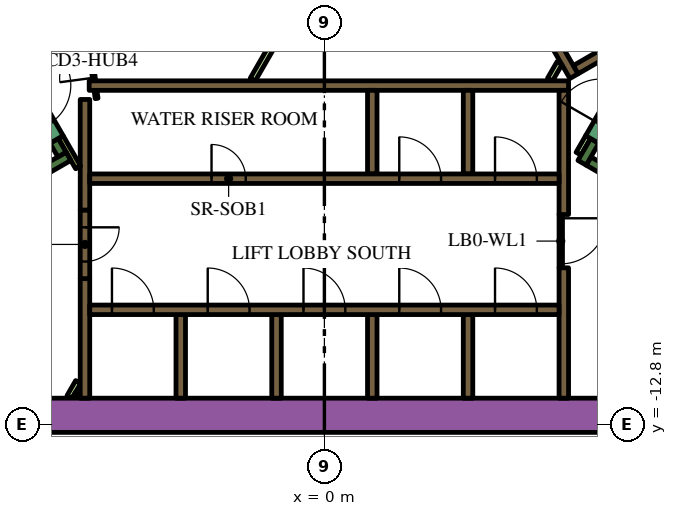
"""IFC4 building model, lengths in metres.
Left out: names, types, materials, properties, quantities, classifications, styles, units other than length and angle.
Written with IfcOpenShell. Run it as: python <this file> out.ifc"""

import sys

from ifc_helpers import new_model, si_unit, direction, frame, frame_2d, origin, place, context, subcontext, project, spatial, polyline, rectangle, outline, extrude, element, fill, save


model = new_model("IFC4")
c1 = context("Model", 3, precision=1e-05, world=origin(), true_north=direction((0.0, 1.0)))
c2 = subcontext(c1, "Body", "Model", "MODEL_VIEW")
j1 = project(units=[si_unit("LENGTHUNIT", "METRE"), si_unit("PLANEANGLEUNIT", "RADIAN")], contexts=[c1])
p1 = place(None, origin())
s1 = spatial("IfcSite", under=j1, at=p1, CompositionType="ELEMENT")
p2 = place(p1, origin())
s2 = spatial("IfcBuilding", under=s1, at=p2, CompositionType="ELEMENT")
p3 = place(p2, frame((0.0, 0.0, 58.8)))
s3 = spatial("IfcBuildingStorey", under=s2, at=p3, CompositionType="ELEMENT", Elevation=58.8)
p4 = place(p3, frame((6.776, 13.364, 0.0), z_axis=(0.0, 0.0, 1.0), x_axis=(0.500004177138, -0.8660229921, 0.0)))
e1 = element("IfcWall", 1, at=p4, inside=s3, PredefinedType="SOLIDWALL", context=c2, shape_type="SweptSolid", body=[
    extrude(rectangle(XDim=20.204, YDim=0.9, at=frame_2d((10.102, 0.0))), origin(), (0.0, 0.0, 1.0), 3.9),
])
p5 = place(p3, frame((-12.019, -12.55, 0.0), z_axis=(0.0, 0.0, 1.0), x_axis=(1.0, 0.0, 0.0)))
e2 = element("IfcWall", 2, at=p5, inside=s3, PredefinedType="SOLIDWALL", context=c2, shape_type="SweptSolid", body=[
    extrude(rectangle(XDim=21.63, YDim=0.9, at=frame_2d((10.815, 0.0))), origin(), (0.0, 0.0, 1.0), 3.9),
])
p6 = place(p3, frame((12.84, -9.261, 0.0), z_axis=(0.0, 0.0, 1.0), x_axis=(-0.866013990052, 0.500019768644, 0.0)))
e3 = element("IfcWall", 3, at=p6, inside=s3, PredefinedType="SOLIDWALL", context=c2, shape_type="SweptSolid", body=[
    extrude(rectangle(XDim=6.8, YDim=0.25, at=frame_2d((3.4, 0.0))), origin(), (0.0, 0.0, 1.0), 3.9),
])
p7 = place(p3, frame((7.113, -5.33, 0.0), z_axis=(0.0, 0.0, 1.0), x_axis=(-0.499965889992, -0.866045096311, 0.0)))
e4 = element("IfcWall", 4, at=p7, inside=s3, PredefinedType="SOLIDWALL", context=c2, shape_type="SweptSolid", body=[
    extrude(rectangle(XDim=0.666, YDim=0.25, at=frame_2d((0.333, 0.0))), origin(), (0.0, 0.0, 1.0), 3.9),
])
p8 = place(p3, frame((-12.84, -9.261, 0.0), z_axis=(0.0, 0.0, 1.0), x_axis=(0.866016039709, 0.500016218704, 0.0)))
e5 = element("IfcWall", 5, at=p8, inside=s3, PredefinedType="SOLIDWALL", context=c2, shape_type="SweptSolid", body=[
    extrude(rectangle(XDim=7.05, YDim=0.25, at=frame_2d((3.525, 0.0))), origin(), (0.0, 0.0, 1.0), 3.9),
])
p9 = place(p3, frame((-6.905, -5.69, 0.0), z_axis=(0.0, 0.0, 1.0), x_axis=(-0.499993700073, 0.866029041019, 0.0)))
e6 = element("IfcWall", 6, at=p9, inside=s3, PredefinedType="SOLIDWALL", context=c2, shape_type="SweptSolid", body=[
    extrude(rectangle(XDim=0.416, YDim=0.25, at=frame_2d((0.208, 0.0))), origin(), (0.0, 0.0, 1.0), 3.9),
])
p10 = place(p3, frame((-3.78, -12.1, 0.0), z_axis=(0.0, 0.0, 1.0), x_axis=(0.0, 1.0, 0.0)))
e7 = element("IfcWall", 7, at=p10, inside=s3, PredefinedType="SOLIDWALL", context=c2, shape_type="SweptSolid", body=[
    extrude(rectangle(XDim=2.2, YDim=0.25, at=frame_2d((1.1, 0.0))), origin(), (0.0, 0.0, 1.0), 3.9),
])
p11 = place(p3, frame((-6.3, -12.1, 0.0), z_axis=(0.0, 0.0, 1.0), x_axis=(0.0, 1.0, 0.0)))
e8 = element("IfcWall", 8, at=p11, inside=s3, PredefinedType="SOLIDWALL", context=c2, shape_type="SweptSolid", body=[
    extrude(rectangle(XDim=3.146, YDim=0.25, at=frame_2d((1.573, 0.0))), origin(), (0.0, 0.0, 1.0), 3.9),
])
p12 = place(p3, frame((-6.3, -4.24, 0.0), z_axis=(0.0, 0.0, 1.0), x_axis=(0.0, -1.0, 0.0)))
e9 = element("IfcWall", 9, at=p12, inside=s3, PredefinedType="SOLIDWALL", context=c2, shape_type="SweptSolid", body=[
    extrude(rectangle(XDim=2.914, YDim=0.25, at=frame_2d((1.457, 0.0))), origin(), (0.0, 0.0, 1.0), 3.9),
])
p13 = place(p3, frame((-6.19, -3.875, 0.0), z_axis=(0.0, 0.0, 1.0), x_axis=(1.0, 0.0, 0.0)))
e10 = element("IfcWall", 10, at=p13, inside=s3, PredefinedType="SOLIDWALL", context=c2, shape_type="SweptSolid", body=[
    extrude(rectangle(XDim=12.615, YDim=0.25, at=frame_2d((6.307, 0.0))), origin(), (0.0, 0.0, 1.0), 3.9),
])
p14 = place(p3, frame((6.3, -8.67, 0.0), z_axis=(0.0, 0.0, 1.0), x_axis=(0.0, -1.0, 0.0)))
e11 = element("IfcWall", 11, at=p14, inside=s3, PredefinedType="SOLIDWALL", context=c2, shape_type="SweptSolid", body=[
    extrude(rectangle(XDim=3.43, YDim=0.25, at=frame_2d((1.715, 0.0))), origin(), (0.0, 0.0, 1.0), 3.9),
])
p15 = place(p3, frame((6.3, -7.268, 0.0), z_axis=(0.0, 0.0, 1.0), x_axis=(0.0, 1.0, 0.0)))
e12 = element("IfcWall", 12, at=p15, inside=s3, PredefinedType="SOLIDWALL", context=c2, shape_type="SweptSolid", body=[
    extrude(rectangle(XDim=3.268, YDim=0.25, at=frame_2d((1.634, 0.0))), origin(), (0.0, 0.0, 1.0), 3.9),
])
for number, where, z_axis, x_axis in (
    (13, (3.78, -4.0, 0.0), (0.0, 0.0, 1.0), (0.0, -1.0, 0.0)),
    (14, (1.26, -4.0, 0.0), (0.0, 0.0, 1.0), (0.0, -1.0, 0.0)),
    (15, (3.78, -12.1, 0.0), (0.0, 0.0, 1.0), (0.0, 1.0, 0.0)),
    (16, (1.26, -12.1, 0.0), (0.0, 0.0, 1.0), (0.0, 1.0, 0.0)),
    (17, (-1.26, -12.1, 0.0), (0.0, 0.0, 1.0), (0.0, 1.0, 0.0)),
):
    element("IfcWall", number, at=place(p3, frame(where, z_axis=z_axis, x_axis=x_axis)), inside=s3, PredefinedType="SOLIDWALL", context=c2, shape_type="SweptSolid", body=[
        extrude(rectangle(XDim=2.2, YDim=0.25, at=frame_2d((1.1, 0.0))), origin(), (0.0, 0.0, 1.0), 3.9),
    ])
p16 = place(p3, origin())
e18 = element("IfcWall", 18, at=p16, inside=s3, PredefinedType="SOLIDWALL", context=c2, shape_type="SweptSolid", body=[
    extrude(outline(polyline([(0.335, 6.925), (0.335, 6.925), (0.335, 7.075), (0.335, 7.075), (0.335, 7.075), (0.245, 7.075), (0.079, 7.363), (0.035, 7.439), (0.252, 7.564), (0.377, 7.348), (6.552, -3.348), (6.677, -3.564), (6.46, -3.689), (4.897, -0.981), (0.332, 6.925), (0.335, 6.925), (0.335, 6.925)])), origin(), (0.0, 0.0, 1.0), 3.9),
])
p17 = place(p3, frame((9.352, -1.875, 0.0), z_axis=(0.0, 0.0, 1.0), x_axis=(-0.866024844342, -0.500000968981, 0.0)))
e19 = element("IfcWall", 19, at=p17, inside=s3, PredefinedType="SOLIDWALL", context=c2, shape_type="SweptSolid", body=[
    extrude(rectangle(XDim=3.162, YDim=0.25, at=frame_2d((1.581, 0.0))), origin(), (0.0, 0.0, 1.0), 3.9),
])
p18 = place(p3, frame((-6.708, -12.068, 0.0), z_axis=(0.0, 0.0, 1.0), x_axis=(0.500000789788, 0.8660249478, 0.0)))
e20 = element("IfcWall", 20, at=p18, inside=s3, PredefinedType="PARTITIONING", context=c2, shape_type="SweptSolid", body=[
    extrude(rectangle(XDim=0.456, YDim=0.15, at=frame_2d((0.228, 0.0))), origin(), (0.0, 0.0, 1.0), 2.75),
])
p19 = place(p3, frame((-6.534, -12.068, 0.0), z_axis=(0.0, 0.0, 1.0), x_axis=(0.500240224089, 0.865886665912, 0.0)))
e21 = element("IfcWall", 21, at=p19, inside=s3, PredefinedType="PARTITIONING", context=c2, shape_type="SweptSolid", body=[
    extrude(rectangle(XDim=0.109, YDim=0.15, at=frame_2d((0.054, 0.0))), origin(), (0.0, 0.0, 1.0), 2.75),
])
p20 = place(p3, frame((-6.48, -6.027, 0.0), z_axis=(0.0, 0.0, 1.0), x_axis=(-0.499936960004, 0.866061796884, 0.0)))
e22 = element("IfcWall", 22, at=p20, inside=s3, PredefinedType="PARTITIONING", context=c2, shape_type="SweptSolid", body=[
    extrude(rectangle(XDim=0.919, YDim=0.15, at=frame_2d((0.46, 0.0))), origin(), (0.0, 0.0, 1.0), 3.9),
])
p21 = place(p3, frame((-1.887, -3.718, 0.0), z_axis=(0.0, 0.0, 1.0), x_axis=(0.499842898591, 0.866116087328, 0.0)))
e23 = element("IfcWall", 23, at=p21, inside=s3, PredefinedType="PARTITIONING", context=c2, shape_type="SweptSolid", body=[
    extrude(rectangle(XDim=0.936, YDim=0.15, at=frame_2d((0.468, 0.0))), origin(), (0.0, 0.0, 1.0), 2.75),
])
p22 = place(p3, frame((6.688, -5.667, 0.0), z_axis=(0.0, 0.0, 1.0), x_axis=(0.499834152157, 0.86612113491, 0.0)))
e24 = element("IfcWall", 24, at=p22, inside=s3, PredefinedType="PARTITIONING", context=c2, shape_type="SweptSolid", body=[
    extrude(rectangle(XDim=0.505, YDim=0.15, at=frame_2d((0.252, 0.0))), origin(), (0.0, 0.0, 1.0), 2.75),
])
p23 = place(p3, frame((5.936, -3.718, 0.0), z_axis=(0.0, 0.0, 1.0), x_axis=(0.499890179513, 0.866088799389, 0.0)))
e25 = element("IfcWall", 25, at=p23, inside=s3, PredefinedType="PARTITIONING", context=c2, shape_type="SweptSolid", body=[
    extrude(rectangle(XDim=0.504, YDim=0.15, at=frame_2d((0.252, 0.0))), origin(), (0.0, 0.0, 1.0), 2.75),
])
p24 = place(p3, frame((-6.175, -9.775, 0.0), z_axis=(0.0, 0.0, 1.0), x_axis=(1.0, 0.0, 0.0)))
e26 = element("IfcWall", 26, at=p24, inside=s3, PredefinedType="SOLIDWALL", context=c2, shape_type="SweptSolid", body=[
    extrude(rectangle(XDim=12.35, YDim=0.25, at=frame_2d((6.175, 0.0))), origin(), (0.0, 0.0, 1.0), 3.9),
])
p25 = place(p24, frame((0.585, 0.0, 0.0)))
e27 = element("IfcOpeningElement", 27, at=p25, cuts=e26, PredefinedType="OPENING", context=c2, shape_type="SweptSolid", body=[
    extrude(rectangle(XDim=1.1, YDim=2.1, at=frame_2d((0.55, 1.05))), frame((0.0, 0.135, 0.0), z_axis=(0.0, -1.0, 0.0), x_axis=(1.0, 0.0, 0.0)), (0.0, 0.0, 1.0), 0.27),
])
p26 = place(p24, frame((3.105, 0.0, 0.0)))
e28 = element("IfcOpeningElement", 28, at=p26, cuts=e26, PredefinedType="OPENING", context=c2, shape_type="SweptSolid", body=[
    extrude(rectangle(XDim=1.1, YDim=2.1, at=frame_2d((0.55, 1.05))), frame((0.0, 0.135, 0.0), z_axis=(0.0, -1.0, 0.0), x_axis=(1.0, 0.0, 0.0)), (0.0, 0.0, 1.0), 0.27),
])
p27 = place(p24, frame((5.625, 0.0, 0.0)))
e29 = element("IfcOpeningElement", 29, at=p27, cuts=e26, PredefinedType="OPENING", context=c2, shape_type="SweptSolid", body=[
    extrude(rectangle(XDim=1.1, YDim=2.1, at=frame_2d((0.55, 1.05))), frame((0.0, 0.135, 0.0), z_axis=(0.0, -1.0, 0.0), x_axis=(1.0, 0.0, 0.0)), (0.0, 0.0, 1.0), 0.27),
])
p28 = place(p24, frame((8.145, 0.0, 0.0)))
e30 = element("IfcOpeningElement", 30, at=p28, cuts=e26, PredefinedType="OPENING", context=c2, shape_type="SweptSolid", body=[
    extrude(rectangle(XDim=1.1, YDim=2.1, at=frame_2d((0.55, 1.05))), frame((0.0, 0.135, 0.0), z_axis=(0.0, -1.0, 0.0), x_axis=(1.0, 0.0, 0.0)), (0.0, 0.0, 1.0), 0.27),
])
p29 = place(p24, frame((10.665, 0.0, 0.0)))
e31 = element("IfcOpeningElement", 31, at=p29, cuts=e26, PredefinedType="OPENING", context=c2, shape_type="SweptSolid", body=[
    extrude(rectangle(XDim=1.1, YDim=2.1, at=frame_2d((0.55, 1.05))), frame((0.0, 0.135, 0.0), z_axis=(0.0, -1.0, 0.0), x_axis=(1.0, 0.0, 0.0)), (0.0, 0.0, 1.0), 0.27),
])
p30 = place(p3, frame((-6.175, -6.325, 0.0), z_axis=(0.0, 0.0, 1.0), x_axis=(1.0, 0.0, 0.0)))
e32 = element("IfcWall", 32, at=p30, inside=s3, PredefinedType="SOLIDWALL", context=c2, shape_type="SweptSolid", body=[
    extrude(rectangle(XDim=12.35, YDim=0.25, at=frame_2d((6.175, 0.0))), origin(), (0.0, 0.0, 1.0), 3.9),
])
p31 = place(p30, frame((3.205, 0.0, 0.0)))
e33 = element("IfcOpeningElement", 33, at=p31, cuts=e32, PredefinedType="OPENING", context=c2, shape_type="SweptSolid", body=[
    extrude(rectangle(XDim=0.9, YDim=2.1, at=frame_2d((0.45, 1.05))), frame((0.0, 0.135, 0.0), z_axis=(0.0, -1.0, 0.0), x_axis=(1.0, 0.0, 0.0)), (0.0, 0.0, 1.0), 0.27),
])
p32 = place(p30, frame((8.145, 0.0, 0.0)))
e34 = element("IfcOpeningElement", 34, at=p32, cuts=e32, PredefinedType="OPENING", context=c2, shape_type="SweptSolid", body=[
    extrude(rectangle(XDim=1.1, YDim=2.1, at=frame_2d((0.55, 1.05))), frame((0.0, 0.135, 0.0), z_axis=(0.0, -1.0, 0.0), x_axis=(1.0, 0.0, 0.0)), (0.0, 0.0, 1.0), 0.27),
])
p33 = place(p30, frame((10.665, 0.0, 0.0)))
e35 = element("IfcOpeningElement", 35, at=p33, cuts=e32, PredefinedType="OPENING", context=c2, shape_type="SweptSolid", body=[
    extrude(rectangle(XDim=1.1, YDim=2.1, at=frame_2d((0.55, 1.05))), frame((0.0, 0.135, 0.0), z_axis=(0.0, -1.0, 0.0), x_axis=(1.0, 0.0, 0.0)), (0.0, 0.0, 1.0), 0.27),
])
p34 = place(p3, frame((7.048, -5.292, 0.0), z_axis=(0.0, 0.0, 1.0), x_axis=(0.49994051562, 0.866059744384, 0.0)))
e36 = element("IfcWall", 36, at=p34, inside=s3, PredefinedType="SOLIDWALL", context=c2, shape_type="SweptSolid", body=[
    extrude(rectangle(XDim=2.1, YDim=0.4, at=frame_2d((1.05, 0.0))), origin(), (0.0, 0.0, 1.0), 3.9),
])
p35 = place(p34, frame((0.45, 0.0, 0.0)))
e37 = element("IfcOpeningElement", 37, at=p35, cuts=e36, PredefinedType="OPENING", context=c2, shape_type="SweptSolid", body=[
    extrude(rectangle(XDim=1.2, YDim=2.1, at=frame_2d((0.6, 1.05))), frame((0.0, 0.21, 0.0), z_axis=(0.0, -1.0, 0.0), x_axis=(1.0, 0.0, 0.0)), (0.0, 0.0, 1.0), 0.42),
])
p36 = place(p3, frame((-8.098, -3.474, 0.0), z_axis=(0.0, 0.0, 1.0), x_axis=(0.49994051562, -0.866059744384, 0.0)))
e38 = element("IfcWall", 38, at=p36, inside=s3, PredefinedType="SOLIDWALL", context=c2, shape_type="SweptSolid", body=[
    extrude(rectangle(XDim=2.1, YDim=0.4, at=frame_2d((1.05, 0.0))), origin(), (0.0, 0.0, 1.0), 3.9),
])
p37 = place(p36, frame((0.45, 0.0, 0.0)))
e39 = element("IfcOpeningElement", 39, at=p37, cuts=e38, PredefinedType="OPENING", context=c2, shape_type="SweptSolid", body=[
    extrude(rectangle(XDim=1.2, YDim=2.1, at=frame_2d((0.6, 1.05))), frame((0.0, 0.21, 0.0), z_axis=(0.0, -1.0, 0.0), x_axis=(1.0, 0.0, 0.0)), (0.0, 0.0, 1.0), 0.42),
])
p38 = place(p3, frame((-6.3, -7.154, 0.0), z_axis=(0.0, 0.0, 1.0), x_axis=(0.0, -1.0, 0.0)))
e40 = element("IfcWall", 40, at=p38, inside=s3, PredefinedType="SOLIDWALL", context=c2, shape_type="SweptSolid", body=[
    extrude(rectangle(XDim=1.8, YDim=0.25, at=frame_2d((0.9, 0.0))), origin(), (0.0, 0.0, 1.0), 3.9),
])
p39 = place(p38, frame((0.45, 0.0, 0.0)))
e41 = element("IfcOpeningElement", 41, at=p39, cuts=e40, PredefinedType="OPENING", context=c2, shape_type="SweptSolid", body=[
    extrude(rectangle(XDim=0.9, YDim=2.1, at=frame_2d((0.45, 1.05))), frame((0.0, 0.135, 0.0), z_axis=(0.0, -1.0, 0.0), x_axis=(1.0, 0.0, 0.0)), (0.0, 0.0, 1.0), 0.27),
])
p40 = place(p3, frame((-5.995, -4.213, 0.0), z_axis=(0.0, 0.0, 1.0), x_axis=(-0.132072335448, 0.991240081014, 0.0)))
e42 = element("IfcWall", 42, at=p40, inside=s3, PredefinedType="PARTITIONING", context=c2, shape_type="SweptSolid", body=[
    extrude(rectangle(XDim=2.1, YDim=0.076, at=frame_2d((1.05, 0.0))), origin(), (0.0, 0.0, 1.0), 2.75),
])
p41 = place(p40, frame((0.55, 0.0, 0.0)))
e43 = element("IfcOpeningElement", 43, at=p41, cuts=e42, PredefinedType="OPENING", context=c2, shape_type="SweptSolid", body=[
    extrude(rectangle(XDim=0.9, YDim=2.1, at=frame_2d((0.45, 1.05))), frame((0.0, 0.048, 0.0), z_axis=(0.0, -1.0, 0.0), x_axis=(1.0, 0.0, 0.0)), (0.0, 0.0, 1.0), 0.096),
])
p42 = place(p3, frame((6.22, -7.266, 0.0), z_axis=(0.0, 0.0, 1.0), x_axis=(0.0, -1.0, 0.0)))
e44 = element("IfcWall", 44, at=p42, inside=s3, PredefinedType="PARTITIONING", context=c2, shape_type="SweptSolid", body=[
    extrude(rectangle(XDim=1.4, YDim=0.09, at=frame_2d((0.7, 0.0))), origin(), (0.0, 0.0, 1.0), 2.75),
])
p43 = place(p42, frame((0.1, 0.0, 0.0)))
e45 = element("IfcOpeningElement", 45, at=p43, cuts=e44, PredefinedType="OPENING", context=c2, shape_type="SweptSolid", body=[
    extrude(rectangle(XDim=1.2, YDim=2.1, at=frame_2d((0.6, 1.05))), frame((0.0, 0.055, 0.0), z_axis=(0.0, -1.0, 0.0), x_axis=(1.0, 0.0, 0.0)), (0.0, 0.0, 1.0), 0.11),
])
p44 = place(p3, frame((6.163, 18.475, 0.0), z_axis=(0.0, 0.0, 1.0), x_axis=(0.500001317485, -0.866024643133, 0.0)))
e46 = element("IfcWall", 46, at=p44, inside=s3, PredefinedType="PARTITIONING", context=c2, shape_type="SweptSolid", body=[
    extrude(rectangle(XDim=25.767, YDim=0.15, at=frame_2d((12.883, 0.0))), origin(), (0.0, 0.0, 1.0), 2.75),
])
p45 = place(p44, frame((24.586, 0.0, 0.0)))
e47 = element("IfcOpeningElement", 47, at=p45, cuts=e46, PredefinedType="OPENING", context=c2, shape_type="SweptSolid", body=[
    extrude(rectangle(XDim=1.0, YDim=2.1, at=frame_2d((0.5, 1.05))), frame((0.0, 0.085, 0.0), z_axis=(0.0, -1.0, 0.0), x_axis=(1.0, 0.0, 0.0)), (0.0, 0.0, 1.0), 0.17),
])
p46 = place(p44, frame((13.144, 0.0, 0.0)))
e48 = element("IfcOpeningElement", 48, at=p46, cuts=e46, PredefinedType="OPENING", context=c2, shape_type="SweptSolid", body=[
    extrude(rectangle(XDim=1.0, YDim=2.1, at=frame_2d((0.5, 1.05))), frame((0.0, 0.085, 0.0), z_axis=(0.0, -1.0, 0.0), x_axis=(1.0, 0.0, 0.0)), (0.0, 0.0, 1.0), 0.17),
])
p47 = place(p44, frame((11.692, 0.0, 0.0)))
e49 = element("IfcOpeningElement", 49, at=p47, cuts=e46, PredefinedType="OPENING", context=c2, shape_type="SweptSolid", body=[
    extrude(rectangle(XDim=1.0, YDim=2.1, at=frame_2d((0.5, 1.05))), frame((0.0, 0.085, 0.0), z_axis=(0.0, -1.0, 0.0), x_axis=(1.0, 0.0, 0.0)), (0.0, 0.0, 1.0), 0.17),
])
p48 = place(p44, frame((0.572, 0.0, 0.0)))
e50 = element("IfcOpeningElement", 50, at=p48, cuts=e46, PredefinedType="OPENING", context=c2, shape_type="SweptSolid", body=[
    extrude(rectangle(XDim=1.0, YDim=2.1, at=frame_2d((0.5, 1.05))), frame((0.0, 0.085, 0.0), z_axis=(0.0, -1.0, 0.0), x_axis=(1.0, 0.0, 0.0)), (0.0, 0.0, 1.0), 0.17),
])
p49 = place(p3, frame((-19.081, -3.9, 0.0), z_axis=(0.0, 0.0, 1.0), x_axis=(0.499998313975, 0.866026377209, 0.0)))
e51 = element("IfcWall", 51, at=p49, inside=s3, PredefinedType="PARTITIONING", context=c2, shape_type="SweptSolid", body=[
    extrude(rectangle(XDim=25.766, YDim=0.15, at=frame_2d((12.883, 0.0))), origin(), (0.0, 0.0, 1.0), 2.75),
])
p50 = place(p49, frame((22.445, 0.0, 0.0)))
e52 = element("IfcOpeningElement", 52, at=p50, cuts=e51, PredefinedType="OPENING", context=c2, shape_type="SweptSolid", body=[
    extrude(rectangle(XDim=1.0, YDim=2.1, at=frame_2d((0.5, 1.05))), frame((0.0, 0.085, 0.0), z_axis=(0.0, -1.0, 0.0), x_axis=(1.0, 0.0, 0.0)), (0.0, 0.0, 1.0), 0.17),
])
p51 = place(p49, frame((21.138, 0.0, 0.0)))
e53 = element("IfcOpeningElement", 53, at=p51, cuts=e51, PredefinedType="OPENING", context=c2, shape_type="SweptSolid", body=[
    extrude(rectangle(XDim=1.0, YDim=2.1, at=frame_2d((0.5, 1.05))), frame((0.0, 0.085, 0.0), z_axis=(0.0, -1.0, 0.0), x_axis=(1.0, 0.0, 0.0)), (0.0, 0.0, 1.0), 0.17),
])
p52 = place(p49, frame((14.066, 0.0, 0.0)))
e54 = element("IfcOpeningElement", 54, at=p52, cuts=e51, PredefinedType="OPENING", context=c2, shape_type="SweptSolid", body=[
    extrude(rectangle(XDim=0.9, YDim=2.1, at=frame_2d((0.45, 1.05))), frame((0.0, 0.085, 0.0), z_axis=(0.0, -1.0, 0.0), x_axis=(1.0, 0.0, 0.0)), (0.0, 0.0, 1.0), 0.17),
])
p53 = place(p49, frame((11.693, 0.0, 0.0)))
e55 = element("IfcOpeningElement", 55, at=p53, cuts=e51, PredefinedType="OPENING", context=c2, shape_type="SweptSolid", body=[
    extrude(rectangle(XDim=1.0, YDim=2.1, at=frame_2d((0.5, 1.05))), frame((0.0, 0.085, 0.0), z_axis=(0.0, -1.0, 0.0), x_axis=(1.0, 0.0, 0.0)), (0.0, 0.0, 1.0), 0.17),
])
p54 = place(p25, origin())
e56 = element("IfcDoor", 56, at=p54, inside=s3, OperationType="DOUBLE_DOOR_SLIDING", PredefinedType="DOOR", context=c2, shape_type="SweptSolid", body=[
    extrude(rectangle(XDim=1.1, YDim=2.1, at=frame_2d((0.55, 1.05))), frame((0.0, 0.025, 0.0), z_axis=(0.0, -1.0, 0.0), x_axis=(1.0, 0.0, 0.0)), (0.0, 0.0, 1.0), 0.05),
])
fill(e27, e56)
p55 = place(p26, origin())
e57 = element("IfcDoor", 57, at=p55, inside=s3, OperationType="DOUBLE_DOOR_SLIDING", PredefinedType="DOOR", context=c2, shape_type="SweptSolid", body=[
    extrude(rectangle(XDim=1.1, YDim=2.1, at=frame_2d((0.55, 1.05))), frame((0.0, 0.025, 0.0), z_axis=(0.0, -1.0, 0.0), x_axis=(1.0, 0.0, 0.0)), (0.0, 0.0, 1.0), 0.05),
])
fill(e28, e57)
p56 = place(p27, origin())
e58 = element("IfcDoor", 58, at=p56, inside=s3, OperationType="DOUBLE_DOOR_SLIDING", PredefinedType="DOOR", context=c2, shape_type="SweptSolid", body=[
    extrude(rectangle(XDim=1.1, YDim=2.1, at=frame_2d((0.55, 1.05))), frame((0.0, 0.025, 0.0), z_axis=(0.0, -1.0, 0.0), x_axis=(1.0, 0.0, 0.0)), (0.0, 0.0, 1.0), 0.05),
])
fill(e29, e58)
p57 = place(p28, origin())
e59 = element("IfcDoor", 59, at=p57, inside=s3, OperationType="DOUBLE_DOOR_SLIDING", PredefinedType="DOOR", context=c2, shape_type="SweptSolid", body=[
    extrude(rectangle(XDim=1.1, YDim=2.1, at=frame_2d((0.55, 1.05))), frame((0.0, 0.025, 0.0), z_axis=(0.0, -1.0, 0.0), x_axis=(1.0, 0.0, 0.0)), (0.0, 0.0, 1.0), 0.05),
])
fill(e30, e59)
p58 = place(p29, origin())
e60 = element("IfcDoor", 60, at=p58, inside=s3, OperationType="DOUBLE_DOOR_SLIDING", PredefinedType="DOOR", context=c2, shape_type="SweptSolid", body=[
    extrude(rectangle(XDim=1.1, YDim=2.1, at=frame_2d((0.55, 1.05))), frame((0.0, 0.025, 0.0), z_axis=(0.0, -1.0, 0.0), x_axis=(1.0, 0.0, 0.0)), (0.0, 0.0, 1.0), 0.05),
])
fill(e31, e60)
p59 = place(p31, origin())
e61 = element("IfcDoor", 61, at=p59, inside=s3, OperationType="SINGLE_SWING_LEFT", PredefinedType="DOOR", context=c2, shape_type="SweptSolid", body=[
    extrude(rectangle(XDim=0.9, YDim=2.1, at=frame_2d((0.45, 1.05))), frame((0.0, 0.025, 0.0), z_axis=(0.0, -1.0, 0.0), x_axis=(1.0, 0.0, 0.0)), (0.0, 0.0, 1.0), 0.05),
])
fill(e33, e61)
p60 = place(p32, origin())
e62 = element("IfcDoor", 62, at=p60, inside=s3, OperationType="DOUBLE_DOOR_SLIDING", PredefinedType="DOOR", context=c2, shape_type="SweptSolid", body=[
    extrude(rectangle(XDim=1.1, YDim=2.1, at=frame_2d((0.55, 1.05))), frame((0.0, 0.025, 0.0), z_axis=(0.0, -1.0, 0.0), x_axis=(1.0, 0.0, 0.0)), (0.0, 0.0, 1.0), 0.05),
])
fill(e34, e62)
p61 = place(p33, origin())
e63 = element("IfcDoor", 63, at=p61, inside=s3, OperationType="DOUBLE_DOOR_SLIDING", PredefinedType="DOOR", context=c2, shape_type="SweptSolid", body=[
    extrude(rectangle(XDim=1.1, YDim=2.1, at=frame_2d((0.55, 1.05))), frame((0.0, 0.025, 0.0), z_axis=(0.0, -1.0, 0.0), x_axis=(1.0, 0.0, 0.0)), (0.0, 0.0, 1.0), 0.05),
])
fill(e35, e63)
p62 = place(p39, origin())
e64 = element("IfcDoor", 64, at=p62, inside=s3, OperationType="SINGLE_SWING_LEFT", PredefinedType="DOOR", context=c2, shape_type="SweptSolid", body=[
    extrude(rectangle(XDim=0.9, YDim=2.1, at=frame_2d((0.45, 1.05))), frame((0.0, 0.025, 0.0), z_axis=(0.0, -1.0, 0.0), x_axis=(1.0, 0.0, 0.0)), (0.0, 0.0, 1.0), 0.05),
])
fill(e41, e64)
p63 = place(p41, origin())
e65 = element("IfcDoor", 65, at=p63, inside=s3, OperationType="SINGLE_SWING_LEFT", PredefinedType="DOOR", context=c2, shape_type="SweptSolid", body=[
    extrude(rectangle(XDim=0.9, YDim=2.1, at=frame_2d((0.45, 1.05))), frame((0.0, 0.025, 0.0), z_axis=(0.0, -1.0, 0.0), x_axis=(1.0, 0.0, 0.0)), (0.0, 0.0, 1.0), 0.05),
])
fill(e43, e65)
p64 = place(p43, origin())
e66 = element("IfcDoor", 66, at=p64, inside=s3, OperationType="SINGLE_SWING_LEFT", PredefinedType="DOOR", context=c2, shape_type="SweptSolid", body=[
    extrude(rectangle(XDim=1.2, YDim=2.1, at=frame_2d((0.6, 1.05))), frame((0.0, 0.025, 0.0), z_axis=(0.0, -1.0, 0.0), x_axis=(1.0, 0.0, 0.0)), (0.0, 0.0, 1.0), 0.05),
])
fill(e45, e66)
save(model, sys.argv[1])
